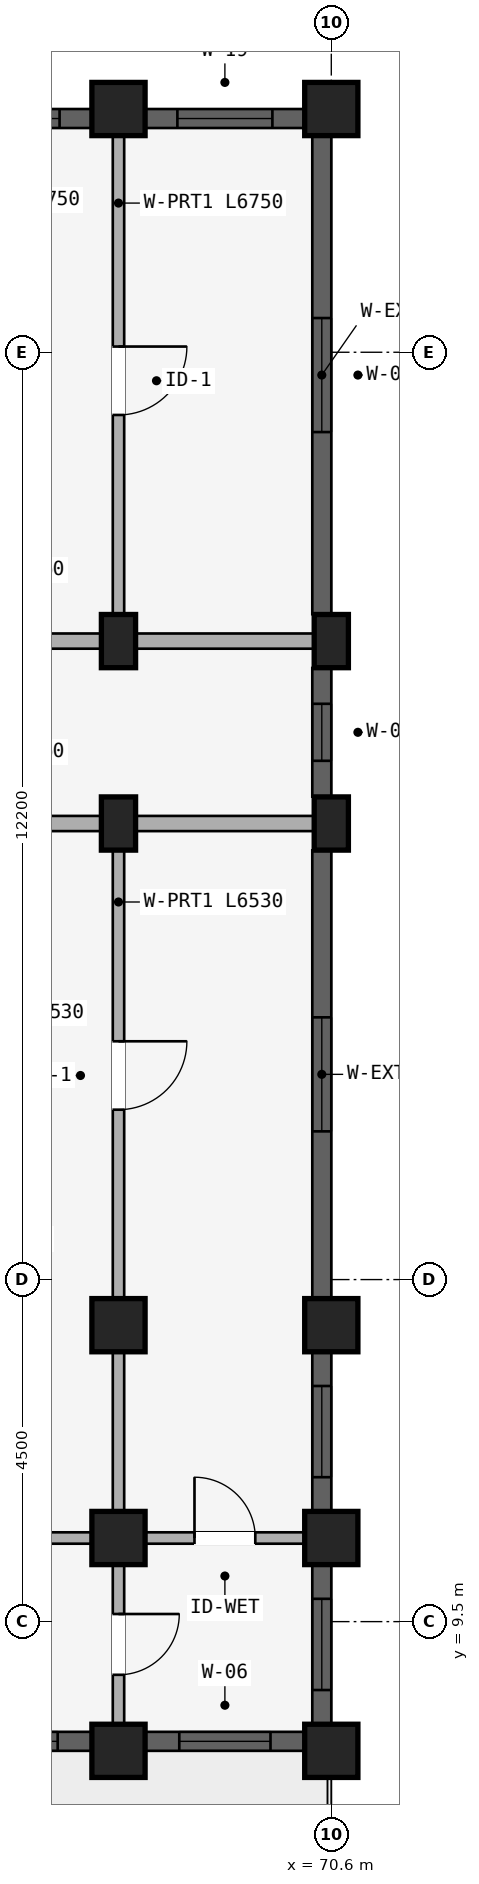
"""IFC4 building model, lengths in metres.
Left out: names, types, materials, properties, quantities, classifications, styles, units other than length and angle.
Written with IfcOpenShell. Run it as: python <this file> out.ifc"""

import sys

from ifc_helpers import new_model, si_unit, direction, frame, frame_2d, origin, origin_2d, place, context, subcontext, project, spatial, rectangle, extrude, element, fill, save


model = new_model("IFC4")
c1 = context("Model", 3, precision=1e-05, world=origin(), true_north=direction((0.0, 1.0)))
c2 = subcontext(c1, "Body", "Model", "MODEL_VIEW")
j1 = project(units=[si_unit("LENGTHUNIT", "METRE"), si_unit("PLANEANGLEUNIT", "RADIAN")], contexts=[c1])
p1 = place(None, origin())
s1 = spatial("IfcSite", under=j1, at=p1, CompositionType="ELEMENT")
p2 = place(p1, origin())
s2 = spatial("IfcBuilding", under=s1, at=p2, CompositionType="ELEMENT")
p3 = place(p2, frame((0.0, 0.0, 24.45)))
s3 = spatial("IfcBuildingStorey", under=s2, at=p3, CompositionType="ELEMENT", Elevation=24.45)
p4 = place(p3, frame((67.8, 29.4, 0.0), z_axis=(0.0, 0.0, 1.0), x_axis=(1.0, 0.0, 0.0)))
e1 = element("IfcColumn", 1, at=p4, inside=s3, PredefinedType="COLUMN", context=c2, shape_type="SweptSolid", body=[
    extrude(rectangle(XDim=0.7, YDim=0.7, at=origin_2d()), origin(), (0.0, 0.0, 1.0), 2.93),
])
for number, where, z_axis, x_axis in (
    (2, (67.8, 22.4, 0.0), (0.0, 0.0, 1.0), (1.0, 0.0, 0.0)),
    (3, (67.8, 20.0, 0.0), (0.0, 0.0, 1.0), (1.0, 0.0, 0.0)),
):
    element("IfcColumn", number, at=place(p3, frame(where, z_axis=z_axis, x_axis=x_axis)), inside=s3, PredefinedType="COLUMN", context=c2, shape_type="SweptSolid", body=[
        extrude(rectangle(XDim=0.45, YDim=0.7, at=origin_2d()), origin(), (0.0, 0.0, 1.0), 2.93),
    ])
for number, where, z_axis, x_axis in (
    (4, (67.8, 13.4, 0.0), (0.0, 0.0, 1.0), (1.0, 0.0, 0.0)),
    (5, (67.8, 10.6, 0.0), (0.0, 0.0, 1.0), (1.0, 0.0, 0.0)),
):
    element("IfcColumn", number, at=place(p3, frame(where, z_axis=z_axis, x_axis=x_axis)), inside=s3, PredefinedType="COLUMN", context=c2, shape_type="SweptSolid", body=[
        extrude(rectangle(XDim=0.7, YDim=0.7, at=origin_2d()), origin(), (0.0, 0.0, 1.0), 2.93),
    ])
for number, where, z_axis, x_axis in (
    (6, (67.8, 7.8, 0.0), (0.0, 0.0, 1.0), (1.0, 0.0, 0.0)),
    (7, (70.6, 29.4, 0.0), (0.0, 0.0, 1.0), (1.0, 0.0, 0.0)),
):
    element("IfcColumn", number, at=place(p3, frame(where, z_axis=z_axis, x_axis=x_axis)), inside=s3, PredefinedType="COLUMN", context=c2, shape_type="SweptSolid", body=[
        extrude(rectangle(XDim=0.7, YDim=0.7, at=origin_2d()), origin(), (0.0, 0.0, 1.0), 2.97),
    ])
for number, where, z_axis, x_axis in (
    (8, (70.6, 22.4, 0.0), (0.0, 0.0, 1.0), (1.0, 0.0, 0.0)),
    (9, (70.6, 20.0, 0.0), (0.0, 0.0, 1.0), (1.0, 0.0, 0.0)),
):
    element("IfcColumn", number, at=place(p3, frame(where, z_axis=z_axis, x_axis=x_axis)), inside=s3, PredefinedType="COLUMN", context=c2, shape_type="SweptSolid", body=[
        extrude(rectangle(XDim=0.45, YDim=0.7, at=origin_2d()), origin(), (0.0, 0.0, 1.0), 2.97),
    ])
for number, where, z_axis, x_axis in (
    (10, (70.6, 13.4, 0.0), (0.0, 0.0, 1.0), (1.0, 0.0, 0.0)),
    (11, (70.6, 10.6, 0.0), (0.0, 0.0, 1.0), (1.0, 0.0, 0.0)),
    (12, (70.6, 7.8, 0.0), (0.0, 0.0, 1.0), (1.0, 0.0, 0.0)),
):
    element("IfcColumn", number, at=place(p3, frame(where, z_axis=z_axis, x_axis=x_axis)), inside=s3, PredefinedType="COLUMN", context=c2, shape_type="SweptSolid", body=[
        extrude(rectangle(XDim=0.7, YDim=0.7, at=origin_2d()), origin(), (0.0, 0.0, 1.0), 2.97),
    ])
p5 = place(p3, frame((65.0, 22.4, 0.0), z_axis=(0.0, 0.0, 1.0), x_axis=(1.0, 0.0, 0.0)))
e13 = element("IfcWall", 13, at=p5, inside=s3, PredefinedType="STANDARD", context=c2, shape_type="SweptSolid", body=[
    extrude(rectangle(XDim=2.8, YDim=0.2, at=frame_2d((1.4, 0.0))), origin(), (0.0, 0.0, 1.0), 2.372),
])
p6 = place(p5, frame((0.9, 0.0, 0.0)))
e14 = element("IfcOpeningElement", 14, at=p6, cuts=e13, PredefinedType="OPENING", context=c2, shape_type="SweptSolid", body=[
    extrude(rectangle(XDim=1.0, YDim=2.15, at=frame_2d((0.5, 1.075))), frame((0.0, 0.11, 0.0), z_axis=(0.0, -1.0, 0.0), x_axis=(1.0, 0.0, 0.0)), (0.0, 0.0, 1.0), 0.22),
])
p7 = place(p3, frame((65.0, 20.0, 0.0), z_axis=(0.0, 0.0, 1.0), x_axis=(1.0, 0.0, 0.0)))
e15 = element("IfcWall", 15, at=p7, inside=s3, PredefinedType="STANDARD", context=c2, shape_type="SweptSolid", body=[
    extrude(rectangle(XDim=2.8, YDim=0.2, at=frame_2d((1.4, 0.0))), origin(), (0.0, 0.0, 1.0), 2.372),
])
p8 = place(p7, frame((0.9, 0.0, 0.0)))
e16 = element("IfcOpeningElement", 16, at=p8, cuts=e15, PredefinedType="OPENING", context=c2, shape_type="SweptSolid", body=[
    extrude(rectangle(XDim=1.0, YDim=2.15, at=frame_2d((0.5, 1.075))), frame((0.0, 0.11, 0.0), z_axis=(0.0, -1.0, 0.0), x_axis=(1.0, 0.0, 0.0)), (0.0, 0.0, 1.0), 0.22),
])
p9 = place(p3, frame((65.08, 10.6, 0.0), z_axis=(0.0, 0.0, 1.0), x_axis=(1.0, 0.0, 0.0)))
e17 = element("IfcWall", 17, at=p9, inside=s3, PredefinedType="PLUMBINGWALL", context=c2, shape_type="SweptSolid", body=[
    extrude(rectangle(XDim=2.64, YDim=0.15, at=frame_2d((1.32, 0.0))), origin(), (0.0, 0.0, 1.0), 2.372),
])
p10 = place(p9, frame((0.87, 0.0, 0.0)))
e18 = element("IfcOpeningElement", 18, at=p10, cuts=e17, PredefinedType="OPENING", context=c2, shape_type="SweptSolid", body=[
    extrude(rectangle(XDim=0.9, YDim=2.1, at=frame_2d((0.45, 1.05))), frame((0.0, 0.085, 0.0), z_axis=(0.0, -1.0, 0.0), x_axis=(1.0, 0.0, 0.0)), (0.0, 0.0, 1.0), 0.17),
])
for number, where, z_axis, x_axis in (
    (19, (67.8, 22.4, 0.0), (0.0, 0.0, 1.0), (1.0, 0.0, 0.0)),
    (20, (67.8, 20.0, 0.0), (0.0, 0.0, 1.0), (1.0, 0.0, 0.0)),
):
    element("IfcWall", number, at=place(p3, frame(where, z_axis=z_axis, x_axis=x_axis)), inside=s3, PredefinedType="STANDARD", context=c2, shape_type="SweptSolid", body=[
        extrude(rectangle(XDim=2.8, YDim=0.2, at=frame_2d((1.4, 0.0))), origin(), (0.0, 0.0, 1.0), 2.372),
    ])
p11 = place(p3, frame((67.88, 10.6, 0.0), z_axis=(0.0, 0.0, 1.0), x_axis=(1.0, 0.0, 0.0)))
e21 = element("IfcWall", 21, at=p11, inside=s3, PredefinedType="PLUMBINGWALL", context=c2, shape_type="SweptSolid", body=[
    extrude(rectangle(XDim=2.64, YDim=0.15, at=frame_2d((1.32, 0.0))), origin(), (0.0, 0.0, 1.0), 2.372),
])
p12 = place(p11, frame((0.92, 0.0, 0.0)))
e22 = element("IfcOpeningElement", 22, at=p12, cuts=e21, PredefinedType="OPENING", context=c2, shape_type="SweptSolid", body=[
    extrude(rectangle(XDim=0.8, YDim=2.1, at=frame_2d((0.4, 1.05))), frame((0.0, 0.085, 0.0), z_axis=(0.0, -1.0, 0.0), x_axis=(1.0, 0.0, 0.0)), (0.0, 0.0, 1.0), 0.17),
])
p13 = place(p3, frame((67.8, 29.2, 0.0), z_axis=(0.0, 0.0, 1.0), x_axis=(0.0, -1.0, 0.0)))
e23 = element("IfcWall", 23, at=p13, inside=s3, PredefinedType="PARTITIONING", context=c2, shape_type="SweptSolid", body=[
    extrude(rectangle(XDim=6.75, YDim=0.15, at=frame_2d((3.375, 0.0))), origin(), (0.0, 0.0, 1.0), 2.372),
])
p14 = place(p13, frame((2.925, 0.0, 0.0)))
e24 = element("IfcOpeningElement", 24, at=p14, cuts=e23, PredefinedType="OPENING", context=c2, shape_type="SweptSolid", body=[
    extrude(rectangle(XDim=0.9, YDim=2.1, at=frame_2d((0.45, 1.05))), frame((0.0, 0.085, 0.0), z_axis=(0.0, -1.0, 0.0), x_axis=(1.0, 0.0, 0.0)), (0.0, 0.0, 1.0), 0.17),
])
p15 = place(p3, frame((67.8, 19.95, 0.0), z_axis=(0.0, 0.0, 1.0), x_axis=(0.0, -1.0, 0.0)))
e25 = element("IfcWall", 25, at=p15, inside=s3, PredefinedType="PARTITIONING", context=c2, shape_type="SweptSolid", body=[
    extrude(rectangle(XDim=6.53, YDim=0.15, at=frame_2d((3.265, 0.0))), origin(), (0.0, 0.0, 1.0), 2.372),
])
p16 = place(p15, frame((2.815, 0.0, 0.0)))
e26 = element("IfcOpeningElement", 26, at=p16, cuts=e25, PredefinedType="OPENING", context=c2, shape_type="SweptSolid", body=[
    extrude(rectangle(XDim=0.9, YDim=2.1, at=frame_2d((0.45, 1.05))), frame((0.0, 0.085, 0.0), z_axis=(0.0, -1.0, 0.0), x_axis=(1.0, 0.0, 0.0)), (0.0, 0.0, 1.0), 0.17),
])
p17 = place(p3, frame((67.8, 13.3, 0.0), z_axis=(0.0, 0.0, 1.0), x_axis=(0.0, -1.0, 0.0)))
e27 = element("IfcWall", 27, at=p17, inside=s3, PredefinedType="PARTITIONING", context=c2, shape_type="SweptSolid", body=[
    extrude(rectangle(XDim=5.22, YDim=0.15, at=frame_2d((2.61, 0.0))), origin(), (0.0, 0.0, 1.0), 2.372),
])
p18 = place(p17, frame((3.7, 0.0, 0.0)))
e28 = element("IfcOpeningElement", 28, at=p18, cuts=e27, PredefinedType="OPENING", context=c2, shape_type="SweptSolid", body=[
    extrude(rectangle(XDim=0.8, YDim=2.1, at=frame_2d((0.4, 1.05))), frame((0.0, 0.085, 0.0), z_axis=(0.0, -1.0, 0.0), x_axis=(1.0, 0.0, 0.0)), (0.0, 0.0, 1.0), 0.17),
])
p19 = place(p3, frame((65.354, 7.925, 0.0), z_axis=(0.0, 0.0, 1.0), x_axis=(1.0, 0.0, 0.0)))
e29 = element("IfcWall", 29, at=p19, inside=s3, PredefinedType="STANDARD", context=c2, shape_type="SweptSolid", body=[
    extrude(rectangle(XDim=2.093, YDim=0.25, at=frame_2d((1.046, 0.0))), origin(), (0.0, 0.0, 1.0), 2.48),
])
p20 = place(p19, frame((0.447, 0.0, 0.78)))
e30 = element("IfcOpeningElement", 30, at=p20, cuts=e29, PredefinedType="OPENING", context=c2, shape_type="SweptSolid", body=[
    extrude(rectangle(XDim=1.2, YDim=1.5, at=frame_2d((0.6, 0.75))), frame((0.0, 0.135, 0.0), z_axis=(0.0, -1.0, 0.0), x_axis=(1.0, 0.0, 0.0)), (0.0, 0.0, 1.0), 0.27),
])
p21 = place(p3, frame((68.154, 7.925, 0.0), z_axis=(0.0, 0.0, 1.0), x_axis=(1.0, 0.0, 0.0)))
e31 = element("IfcWall", 31, at=p21, inside=s3, PredefinedType="STANDARD", context=c2, shape_type="SweptSolid", body=[
    extrude(rectangle(XDim=2.093, YDim=0.25, at=frame_2d((1.046, 0.0))), origin(), (0.0, 0.0, 1.0), 2.48),
])
p22 = place(p21, frame((0.447, 0.0, 0.78)))
e32 = element("IfcOpeningElement", 32, at=p22, cuts=e31, PredefinedType="OPENING", context=c2, shape_type="SweptSolid", body=[
    extrude(rectangle(XDim=1.2, YDim=1.5, at=frame_2d((0.6, 0.75))), frame((0.0, 0.135, 0.0), z_axis=(0.0, -1.0, 0.0), x_axis=(1.0, 0.0, 0.0)), (0.0, 0.0, 1.0), 0.27),
])
p23 = place(p3, frame((65.354, 29.275, 0.0), z_axis=(0.0, 0.0, 1.0), x_axis=(1.0, 0.0, 0.0)))
e33 = element("IfcWall", 33, at=p23, inside=s3, PredefinedType="STANDARD", context=c2, shape_type="SweptSolid", body=[
    extrude(rectangle(XDim=2.093, YDim=0.25, at=frame_2d((1.046, 0.0))), origin(), (0.0, 0.0, 1.0), 2.472),
])
p24 = place(p23, frame((0.421, 0.0, 0.722)))
e34 = element("IfcOpeningElement", 34, at=p24, cuts=e33, PredefinedType="OPENING", context=c2, shape_type="SweptSolid", body=[
    extrude(rectangle(XDim=1.25, YDim=1.55, at=frame_2d((0.625, 0.775))), frame((0.0, 0.135, 0.0), z_axis=(0.0, -1.0, 0.0), x_axis=(1.0, 0.0, 0.0)), (0.0, 0.0, 1.0), 0.27),
])
p25 = place(p3, frame((68.154, 29.275, 0.0), z_axis=(0.0, 0.0, 1.0), x_axis=(1.0, 0.0, 0.0)))
e35 = element("IfcWall", 35, at=p25, inside=s3, PredefinedType="STANDARD", context=c2, shape_type="SweptSolid", body=[
    extrude(rectangle(XDim=2.093, YDim=0.25, at=frame_2d((1.046, 0.0))), origin(), (0.0, 0.0, 1.0), 2.472),
])
p26 = place(p25, frame((0.421, 0.0, 0.722)))
e36 = element("IfcOpeningElement", 36, at=p26, cuts=e35, PredefinedType="OPENING", context=c2, shape_type="SweptSolid", body=[
    extrude(rectangle(XDim=1.25, YDim=1.55, at=frame_2d((0.625, 0.775))), frame((0.0, 0.135, 0.0), z_axis=(0.0, -1.0, 0.0), x_axis=(1.0, 0.0, 0.0)), (0.0, 0.0, 1.0), 0.27),
])
p27 = place(p3, frame((70.475, 29.046, 0.0), z_axis=(0.0, 0.0, 1.0), x_axis=(0.0, -1.0, 0.0)))
e37 = element("IfcWall", 37, at=p27, inside=s3, PredefinedType="STANDARD", context=c2, shape_type="SweptSolid", body=[
    extrude(rectangle(XDim=6.293, YDim=0.25, at=frame_2d((3.146, 0.0))), origin(), (0.0, 0.0, 1.0), 2.372),
])
p28 = place(p27, frame((2.396, 0.0, 0.522)))
e38 = element("IfcOpeningElement", 38, at=p28, cuts=e37, PredefinedType="OPENING", context=c2, shape_type="SweptSolid", body=[
    extrude(rectangle(XDim=1.5, YDim=1.65, at=frame_2d((0.75, 0.825))), frame((0.0, 0.135, 0.0), z_axis=(0.0, -1.0, 0.0), x_axis=(1.0, 0.0, 0.0)), (0.0, 0.0, 1.0), 0.27),
])
p29 = place(p3, frame((70.475, 22.046, 0.0), z_axis=(0.0, 0.0, 1.0), x_axis=(0.0, -1.0, 0.0)))
e39 = element("IfcWall", 39, at=p29, inside=s3, PredefinedType="STANDARD", context=c2, shape_type="SweptSolid", body=[
    extrude(rectangle(XDim=1.693, YDim=0.25, at=frame_2d((0.846, 0.0))), origin(), (0.0, 0.0, 1.0), 2.372),
])
p30 = place(p29, frame((0.471, 0.0, 0.88)))
e40 = element("IfcOpeningElement", 40, at=p30, cuts=e39, PredefinedType="OPENING", context=c2, shape_type="SweptSolid", body=[
    extrude(rectangle(XDim=0.75, YDim=1.05, at=frame_2d((0.375, 0.525))), frame((0.0, 0.135, 0.0), z_axis=(0.0, -1.0, 0.0), x_axis=(1.0, 0.0, 0.0)), (0.0, 0.0, 1.0), 0.27),
])
p31 = place(p3, frame((70.475, 19.646, 0.0), z_axis=(0.0, 0.0, 1.0), x_axis=(0.0, -1.0, 0.0)))
e41 = element("IfcWall", 41, at=p31, inside=s3, PredefinedType="STANDARD", context=c2, shape_type="SweptSolid", body=[
    extrude(rectangle(XDim=5.893, YDim=0.25, at=frame_2d((2.947, 0.0))), origin(), (0.0, 0.0, 1.0), 2.372),
])
p32 = place(p31, frame((2.197, 0.0, 0.522)))
e42 = element("IfcOpeningElement", 42, at=p32, cuts=e41, PredefinedType="OPENING", context=c2, shape_type="SweptSolid", body=[
    extrude(rectangle(XDim=1.5, YDim=1.65, at=frame_2d((0.75, 0.825))), frame((0.0, 0.135, 0.0), z_axis=(0.0, -1.0, 0.0), x_axis=(1.0, 0.0, 0.0)), (0.0, 0.0, 1.0), 0.27),
])
p33 = place(p3, frame((70.475, 13.046, 0.0), z_axis=(0.0, 0.0, 1.0), x_axis=(0.0, -1.0, 0.0)))
e43 = element("IfcWall", 43, at=p33, inside=s3, PredefinedType="STANDARD", context=c2, shape_type="SweptSolid", body=[
    extrude(rectangle(XDim=2.093, YDim=0.25, at=frame_2d((1.046, 0.0))), origin(), (0.0, 0.0, 1.0), 2.372),
])
p34 = place(p33, frame((0.447, 0.0, 0.672)))
e44 = element("IfcOpeningElement", 44, at=p34, cuts=e43, PredefinedType="OPENING", context=c2, shape_type="SweptSolid", body=[
    extrude(rectangle(XDim=1.2, YDim=1.5, at=frame_2d((0.6, 0.75))), frame((0.0, 0.135, 0.0), z_axis=(0.0, -1.0, 0.0), x_axis=(1.0, 0.0, 0.0)), (0.0, 0.0, 1.0), 0.27),
])
p35 = place(p3, frame((70.475, 10.247, 0.0), z_axis=(0.0, 0.0, 1.0), x_axis=(0.0, -1.0, 0.0)))
e45 = element("IfcWall", 45, at=p35, inside=s3, PredefinedType="STANDARD", context=c2, shape_type="SweptSolid", body=[
    extrude(rectangle(XDim=2.093, YDim=0.25, at=frame_2d((1.046, 0.0))), origin(), (0.0, 0.0, 1.0), 2.412),
])
p36 = place(p35, frame((0.447, 0.0, 0.712)))
e46 = element("IfcOpeningElement", 46, at=p36, cuts=e45, PredefinedType="OPENING", context=c2, shape_type="SweptSolid", body=[
    extrude(rectangle(XDim=1.2, YDim=1.5, at=frame_2d((0.6, 0.75))), frame((0.0, 0.135, 0.0), z_axis=(0.0, -1.0, 0.0), x_axis=(1.0, 0.0, 0.0)), (0.0, 0.0, 1.0), 0.27),
])
p37 = place(p20, origin())
e47 = element("IfcWindow", 47, at=p37, inside=s3, PartitioningType="SINGLE_PANEL", PredefinedType="WINDOW", context=c2, shape_type="SweptSolid", body=[
    extrude(rectangle(XDim=1.2, YDim=1.5, at=frame_2d((0.6, 0.75))), frame((0.0, 0.03, 0.0), z_axis=(0.0, -1.0, 0.0), x_axis=(1.0, 0.0, 0.0)), (0.0, 0.0, 1.0), 0.06),
])
fill(e30, e47)
p38 = place(p22, origin())
e48 = element("IfcWindow", 48, at=p38, inside=s3, PartitioningType="SINGLE_PANEL", PredefinedType="WINDOW", context=c2, shape_type="SweptSolid", body=[
    extrude(rectangle(XDim=1.2, YDim=1.5, at=frame_2d((0.6, 0.75))), frame((0.0, 0.03, 0.0), z_axis=(0.0, -1.0, 0.0), x_axis=(1.0, 0.0, 0.0)), (0.0, 0.0, 1.0), 0.06),
])
fill(e32, e48)
p39 = place(p24, origin())
e49 = element("IfcWindow", 49, at=p39, inside=s3, PartitioningType="SINGLE_PANEL", PredefinedType="WINDOW", context=c2, shape_type="SweptSolid", body=[
    extrude(rectangle(XDim=1.25, YDim=1.55, at=frame_2d((0.625, 0.775))), frame((0.0, 0.03, 0.0), z_axis=(0.0, -1.0, 0.0), x_axis=(1.0, 0.0, 0.0)), (0.0, 0.0, 1.0), 0.06),
])
fill(e34, e49)
p40 = place(p26, origin())
e50 = element("IfcWindow", 50, at=p40, inside=s3, PartitioningType="SINGLE_PANEL", PredefinedType="WINDOW", context=c2, shape_type="SweptSolid", body=[
    extrude(rectangle(XDim=1.25, YDim=1.55, at=frame_2d((0.625, 0.775))), frame((0.0, 0.03, 0.0), z_axis=(0.0, -1.0, 0.0), x_axis=(1.0, 0.0, 0.0)), (0.0, 0.0, 1.0), 0.06),
])
fill(e36, e50)
p41 = place(p28, origin())
e51 = element("IfcWindow", 51, at=p41, inside=s3, PartitioningType="DOUBLE_PANEL_VERTICAL", PredefinedType="WINDOW", context=c2, shape_type="SweptSolid", body=[
    extrude(rectangle(XDim=1.5, YDim=1.65, at=frame_2d((0.75, 0.825))), frame((0.0, 0.03, 0.0), z_axis=(0.0, -1.0, 0.0), x_axis=(1.0, 0.0, 0.0)), (0.0, 0.0, 1.0), 0.06),
])
fill(e38, e51)
p42 = place(p30, origin())
e52 = element("IfcWindow", 52, at=p42, inside=s3, PartitioningType="SINGLE_PANEL", PredefinedType="WINDOW", context=c2, shape_type="SweptSolid", body=[
    extrude(rectangle(XDim=0.75, YDim=1.05, at=frame_2d((0.375, 0.525))), frame((0.0, 0.03, 0.0), z_axis=(0.0, -1.0, 0.0), x_axis=(1.0, 0.0, 0.0)), (0.0, 0.0, 1.0), 0.06),
])
fill(e40, e52)
p43 = place(p32, origin())
e53 = element("IfcWindow", 53, at=p43, inside=s3, PartitioningType="DOUBLE_PANEL_VERTICAL", PredefinedType="WINDOW", context=c2, shape_type="SweptSolid", body=[
    extrude(rectangle(XDim=1.5, YDim=1.65, at=frame_2d((0.75, 0.825))), frame((0.0, 0.03, 0.0), z_axis=(0.0, -1.0, 0.0), x_axis=(1.0, 0.0, 0.0)), (0.0, 0.0, 1.0), 0.06),
])
fill(e42, e53)
p44 = place(p34, origin())
e54 = element("IfcWindow", 54, at=p44, inside=s3, PartitioningType="SINGLE_PANEL", PredefinedType="WINDOW", context=c2, shape_type="SweptSolid", body=[
    extrude(rectangle(XDim=1.2, YDim=1.5, at=frame_2d((0.6, 0.75))), frame((0.0, 0.03, 0.0), z_axis=(0.0, -1.0, 0.0), x_axis=(1.0, 0.0, 0.0)), (0.0, 0.0, 1.0), 0.06),
])
fill(e44, e54)
p45 = place(p36, origin())
e55 = element("IfcWindow", 55, at=p45, inside=s3, PartitioningType="SINGLE_PANEL", PredefinedType="WINDOW", context=c2, shape_type="SweptSolid", body=[
    extrude(rectangle(XDim=1.2, YDim=1.5, at=frame_2d((0.6, 0.75))), frame((0.0, 0.03, 0.0), z_axis=(0.0, -1.0, 0.0), x_axis=(1.0, 0.0, 0.0)), (0.0, 0.0, 1.0), 0.06),
])
fill(e46, e55)
p46 = place(p12, origin())
e56 = element("IfcDoor", 56, at=p46, inside=s3, OperationType="SINGLE_SWING_LEFT", PredefinedType="DOOR", context=c2, shape_type="SweptSolid", body=[
    extrude(rectangle(XDim=0.8, YDim=2.1, at=frame_2d((0.4, 1.05))), frame((0.0, 0.025, 0.0), z_axis=(0.0, -1.0, 0.0), x_axis=(1.0, 0.0, 0.0)), (0.0, 0.0, 1.0), 0.05),
])
fill(e22, e56)
p47 = place(p14, frame((0.9, 0.0, 0.0), z_axis=(0.0, 0.0, 1.0), x_axis=(-1.0, 0.0, 0.0)))
e57 = element("IfcDoor", 57, at=p47, inside=s3, OperationType="SINGLE_SWING_RIGHT", PredefinedType="DOOR", context=c2, shape_type="SweptSolid", body=[
    extrude(rectangle(XDim=0.9, YDim=2.1, at=frame_2d((0.45, 1.05))), frame((0.0, 0.025, 0.0), z_axis=(0.0, -1.0, 0.0), x_axis=(1.0, 0.0, 0.0)), (0.0, 0.0, 1.0), 0.05),
])
fill(e24, e57)
p48 = place(p16, origin())
e58 = element("IfcDoor", 58, at=p48, inside=s3, OperationType="SINGLE_SWING_LEFT", PredefinedType="DOOR", context=c2, shape_type="SweptSolid", body=[
    extrude(rectangle(XDim=0.9, YDim=2.1, at=frame_2d((0.45, 1.05))), frame((0.0, 0.025, 0.0), z_axis=(0.0, -1.0, 0.0), x_axis=(1.0, 0.0, 0.0)), (0.0, 0.0, 1.0), 0.05),
])
fill(e26, e58)
p49 = place(p18, frame((0.8, 0.0, 0.0), z_axis=(0.0, 0.0, 1.0), x_axis=(-1.0, 0.0, 0.0)))
e59 = element("IfcDoor", 59, at=p49, inside=s3, OperationType="SINGLE_SWING_RIGHT", PredefinedType="DOOR", context=c2, shape_type="SweptSolid", body=[
    extrude(rectangle(XDim=0.8, YDim=2.1, at=frame_2d((0.4, 1.05))), frame((0.0, 0.025, 0.0), z_axis=(0.0, -1.0, 0.0), x_axis=(1.0, 0.0, 0.0)), (0.0, 0.0, 1.0), 0.05),
])
fill(e28, e59)
save(model, sys.argv[1])
